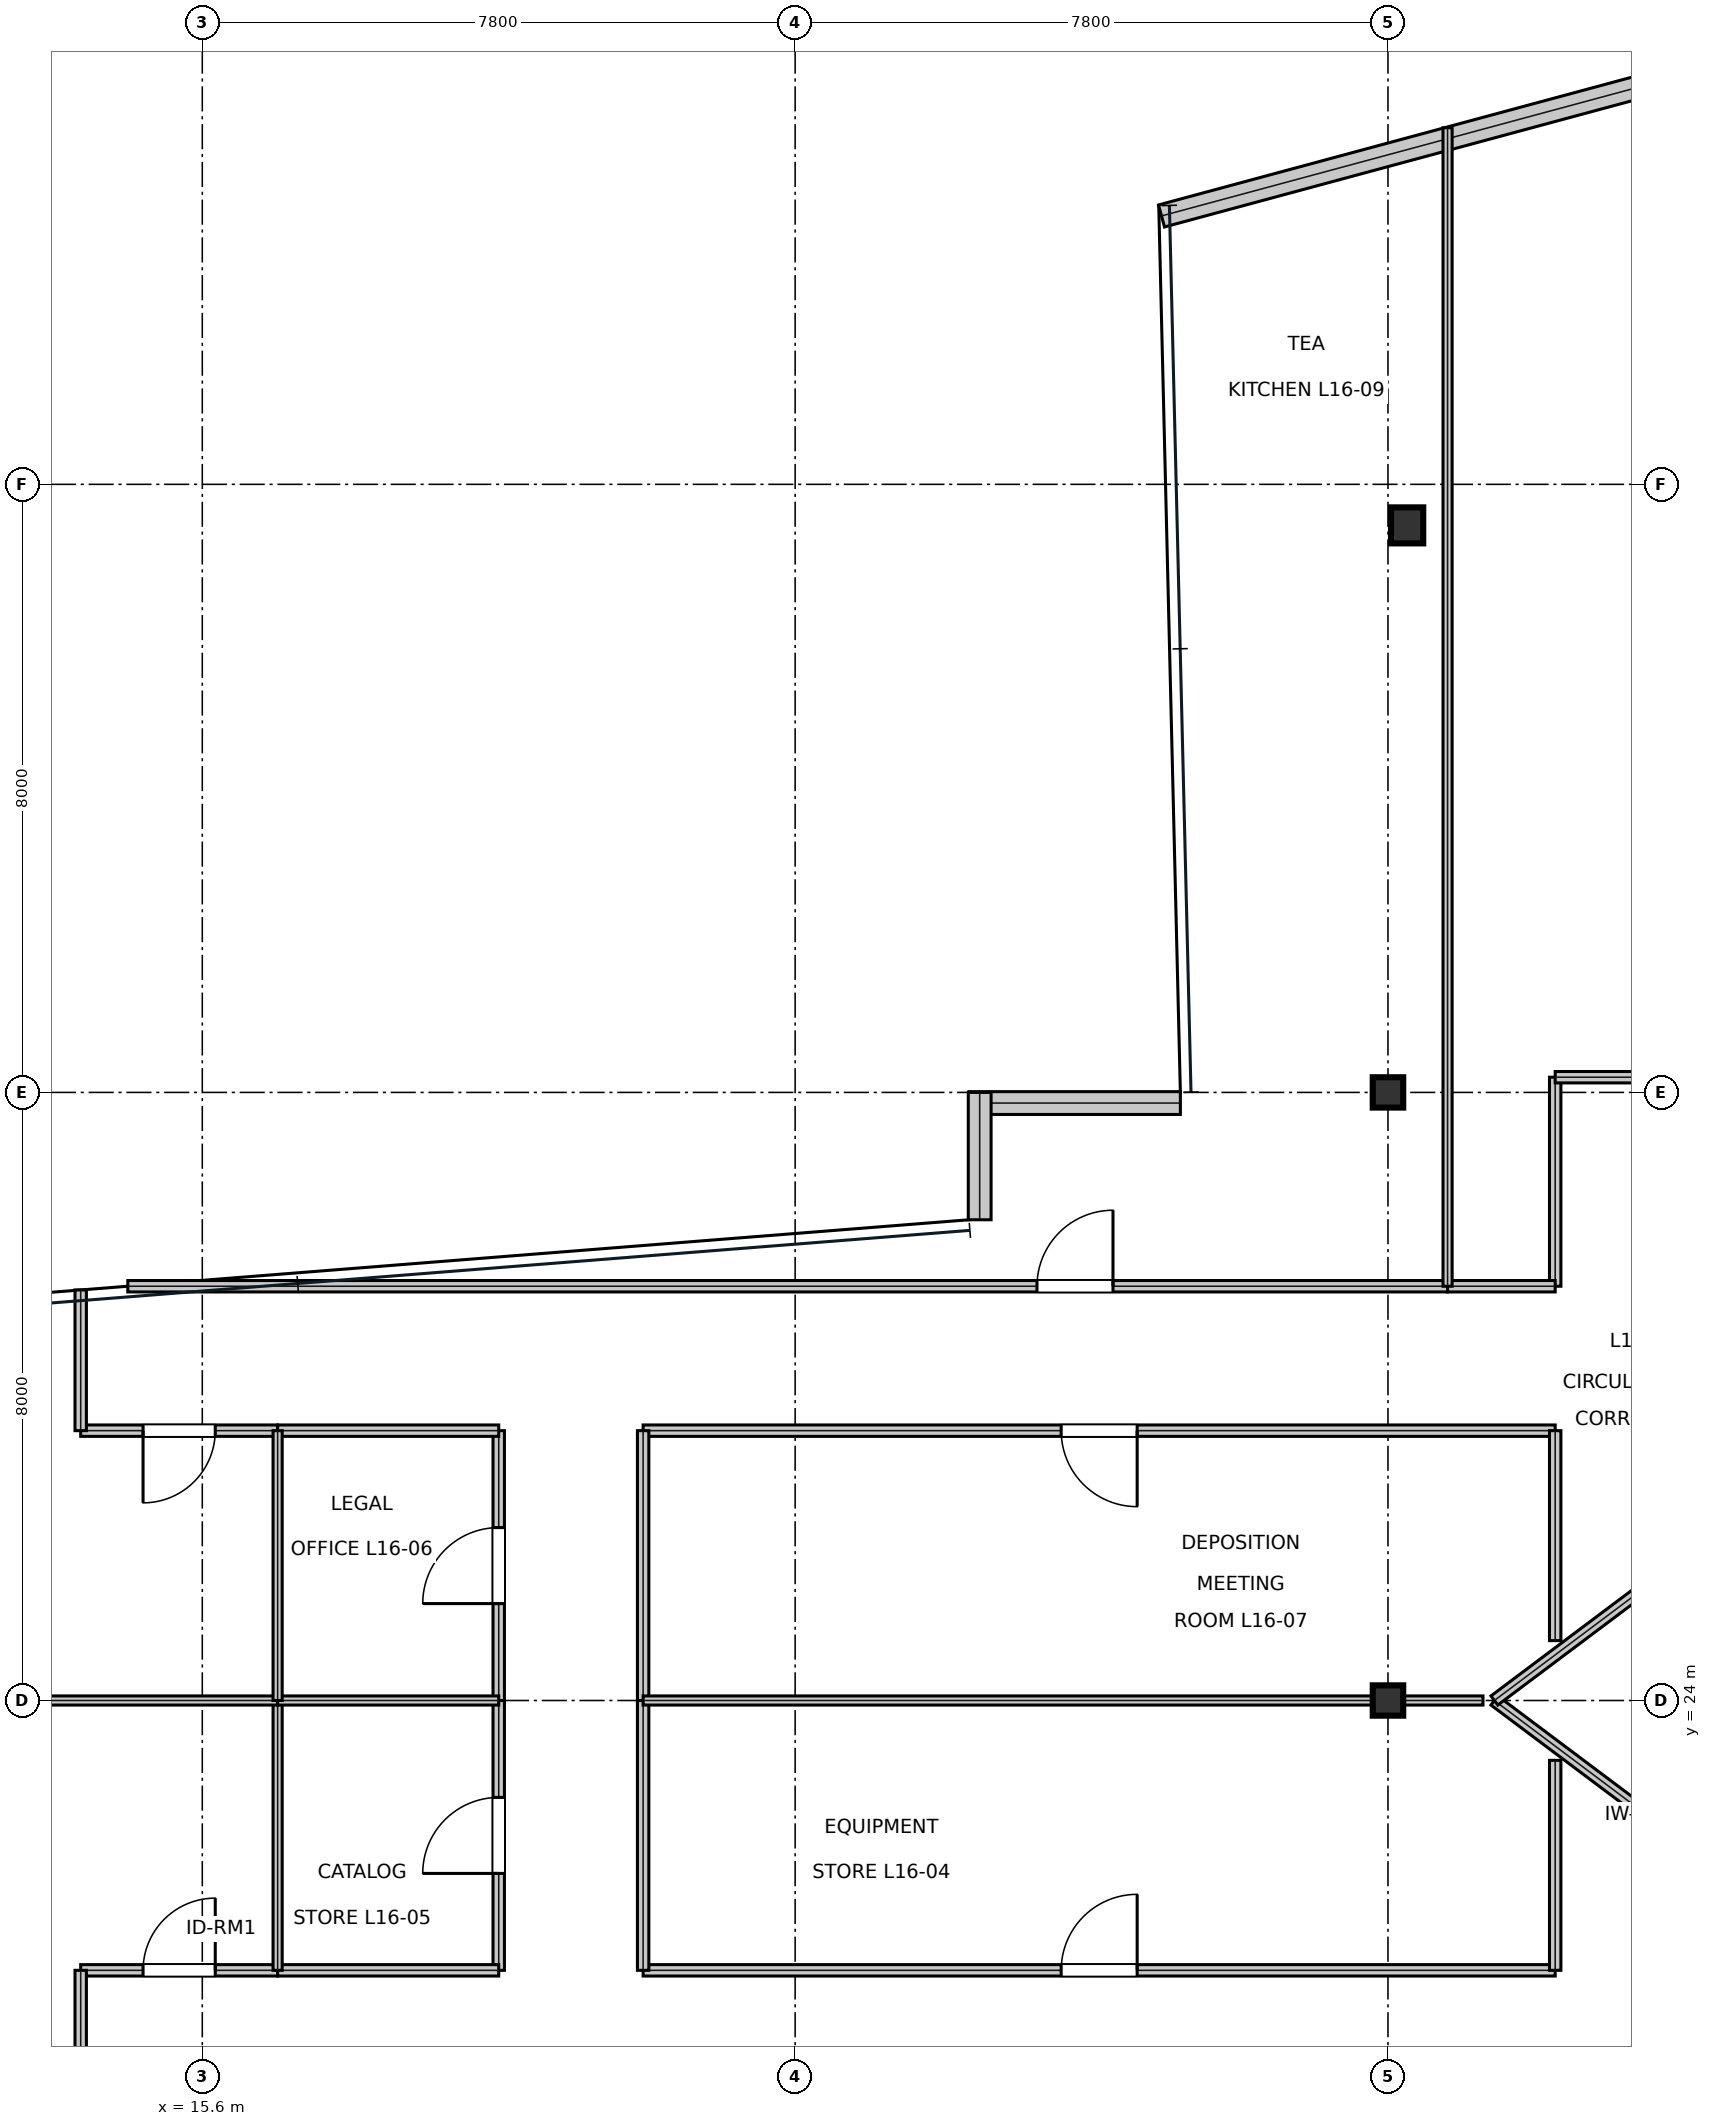
"""IFC4 building model, lengths in metres.
Left out: names, types, materials, properties, quantities, classifications, styles, units other than length and angle.
Written with IfcOpenShell. Run it as: python <this file> out.ifc"""

import sys

from ifc_helpers import new_model, si_unit, direction, frame, frame_2d, origin, origin_2d, place, context, subcontext, project, spatial, rectangle, i_section, extrude, element, fill, save


model = new_model("IFC4")
c1 = context("Model", 3, precision=1e-05, world=origin(), true_north=direction((0.0, 1.0)))
c2 = subcontext(c1, "Body", "Model", "MODEL_VIEW")
j1 = project(units=[si_unit("LENGTHUNIT", "METRE"), si_unit("PLANEANGLEUNIT", "RADIAN")], contexts=[c1])
p1 = place(None, origin())
s1 = spatial("IfcSite", under=j1, at=p1, CompositionType="ELEMENT")
p2 = place(p1, origin())
s2 = spatial("IfcBuilding", under=s1, at=p2, CompositionType="ELEMENT")
p3 = place(p2, frame((0.0, 0.0, 74.25)))
s3 = spatial("IfcBuildingStorey", under=s2, at=p3, CompositionType="ELEMENT", Elevation=74.25)
for number, where, z_axis, x_axis in (
    (1, (31.2, 24.0, 0.0), (0.0, 0.0, 1.0), (1.0, 0.0, 0.0)),
    (2, (31.2, 32.0, 0.0), (0.0, 0.0, 1.0), (1.0, 0.0, 0.0)),
):
    element("IfcColumn", number, at=place(p3, frame(where, z_axis=z_axis, x_axis=x_axis)), inside=s3, PredefinedType="COLUMN", context=c2, shape_type="SweptSolid", body=[
        extrude(i_section(OverallWidth=0.401, OverallDepth=0.399, WebThickness=0.025, FlangeThickness=0.04, at=origin_2d()), origin(), (0.0, 0.0, 1.0), 4.044),
    ])
p4 = place(p3, frame((31.452, 39.46, 0.016), z_axis=(0.0, 0.0, 1.0), x_axis=(1.0, 0.0, 0.0)))
e3 = element("IfcColumn", 3, at=p4, inside=s3, PredefinedType="COLUMN", context=c2, shape_type="SweptSolid", body=[
    extrude(i_section(OverallWidth=0.424, OverallDepth=0.474, WebThickness=0.048, FlangeThickness=0.077, at=origin_2d()), origin(), (0.0, 0.0, 1.0), 4.018),
])
p5 = place(p3, frame((34.962, 45.351, 0.0), z_axis=(0.0, 0.0, 1.0), x_axis=(-0.965438319853, -0.260631637679, 0.0)))
e4 = element("IfcWall", 4, at=p5, inside=s3, PredefinedType="STANDARD", context=c2, shape_type="SweptSolid", body=[
    extrude(rectangle(XDim=6.983, YDim=0.3, at=frame_2d((3.492, 0.0))), origin(), (0.0, 0.0, 1.0), 3.81),
])
p6 = place(p3, frame((28.469, 31.86, 0.0), z_axis=(0.0, 0.0, 1.0), x_axis=(-1.0, 0.0, 0.0)))
e5 = element("IfcWall", 5, at=p6, inside=s3, PredefinedType="STANDARD", context=c2, shape_type="SweptSolid", body=[
    extrude(rectangle(XDim=2.781, YDim=0.3, at=frame_2d((1.39, 0.0))), origin(), (0.0, 0.0, 1.0), 3.81),
])
p7 = place(p3, frame((25.828, 32.0, 0.0), z_axis=(0.0, 0.0, 1.0), x_axis=(0.0, -1.0, 0.0)))
e6 = element("IfcWall", 6, at=p7, inside=s3, PredefinedType="STANDARD", context=c2, shape_type="SweptSolid", body=[
    extrude(rectangle(XDim=1.675, YDim=0.3, at=frame_2d((0.838, 0.0))), origin(), (0.0, 0.0, 1.0), 3.338),
])
p8 = place(p3, frame((14.0, 20.45, 0.0), z_axis=(0.0, 0.0, 1.0), x_axis=(1.0, 0.0, 0.0)))
e7 = element("IfcWall", 7, at=p8, inside=s3, PredefinedType="PARTITIONING", context=c2, shape_type="SweptSolid", body=[
    extrude(rectangle(XDim=2.591, YDim=0.15, at=frame_2d((1.295, 0.0))), origin(), (0.0, 0.0, 1.0), 3.391),
])
p9 = place(p8, frame((0.821, 0.0, 0.0)))
e8 = element("IfcOpeningElement", 8, at=p9, cuts=e7, PredefinedType="OPENING", context=c2, shape_type="SweptSolid", body=[
    extrude(rectangle(XDim=0.95, YDim=2.15, at=frame_2d((0.475, 1.075))), frame((0.0, 0.085, 0.0), z_axis=(0.0, -1.0, 0.0), x_axis=(1.0, 0.0, 0.0)), (0.0, 0.0, 1.0), 0.17),
])
p10 = place(p3, frame((21.4, 20.45, 0.0), z_axis=(0.0, 0.0, 1.0), x_axis=(1.0, 0.0, 0.0)))
e9 = element("IfcWall", 9, at=p10, inside=s3, PredefinedType="PARTITIONING", context=c2, shape_type="SweptSolid", body=[
    extrude(rectangle(XDim=12.0, YDim=0.15, at=frame_2d((6.0, 0.0))), origin(), (0.0, 0.0, 1.0), 3.181),
])
p11 = place(p10, frame((5.5, 0.0, 0.0)))
e10 = element("IfcOpeningElement", 10, at=p11, cuts=e9, PredefinedType="OPENING", context=c2, shape_type="SweptSolid", body=[
    extrude(rectangle(XDim=1.0, YDim=2.15, at=frame_2d((0.5, 1.075))), frame((0.0, 0.085, 0.0), z_axis=(0.0, -1.0, 0.0), x_axis=(1.0, 0.0, 0.0)), (0.0, 0.0, 1.0), 0.17),
])
p12 = place(p3, frame((19.5, 20.45, 0.0), z_axis=(0.0, 0.0, 1.0), x_axis=(0.0, 1.0, 0.0)))
e11 = element("IfcWall", 11, at=p12, inside=s3, PredefinedType="PARTITIONING", context=c2, shape_type="SweptSolid", body=[
    extrude(rectangle(XDim=3.55, YDim=0.15, at=frame_2d((1.775, 0.0))), origin(), (0.0, 0.0, 1.0), 3.181),
])
p13 = place(p12, frame((1.275, 0.0, 0.0)))
e12 = element("IfcOpeningElement", 12, at=p13, cuts=e11, PredefinedType="OPENING", context=c2, shape_type="SweptSolid", body=[
    extrude(rectangle(XDim=1.0, YDim=2.15, at=frame_2d((0.5, 1.075))), frame((0.0, 0.085, 0.0), z_axis=(0.0, -1.0, 0.0), x_axis=(1.0, 0.0, 0.0)), (0.0, 0.0, 1.0), 0.17),
])
p14 = place(p3, frame((19.5, 24.0, 0.0), z_axis=(0.0, 0.0, 1.0), x_axis=(0.0, 1.0, 0.0)))
e13 = element("IfcWall", 13, at=p14, inside=s3, PredefinedType="PARTITIONING", context=c2, shape_type="SweptSolid", body=[
    extrude(rectangle(XDim=3.55, YDim=0.15, at=frame_2d((1.775, 0.0))), origin(), (0.0, 0.0, 1.0), 3.181),
])
p15 = place(p14, frame((1.275, 0.0, 0.0)))
e14 = element("IfcOpeningElement", 14, at=p15, cuts=e13, PredefinedType="OPENING", context=c2, shape_type="SweptSolid", body=[
    extrude(rectangle(XDim=1.0, YDim=2.15, at=frame_2d((0.5, 1.075))), frame((0.0, 0.085, 0.0), z_axis=(0.0, -1.0, 0.0), x_axis=(1.0, 0.0, 0.0)), (0.0, 0.0, 1.0), 0.17),
])
p16 = place(p3, frame((21.4, 27.55, 0.0), z_axis=(0.0, 0.0, 1.0), x_axis=(1.0, 0.0, 0.0)))
e15 = element("IfcWall", 15, at=p16, inside=s3, PredefinedType="PARTITIONING", context=c2, shape_type="SweptSolid", body=[
    extrude(rectangle(XDim=12.0, YDim=0.15, at=frame_2d((6.0, 0.0))), origin(), (0.0, 0.0, 1.0), 3.181),
])
p17 = place(p16, frame((5.5, 0.0, 0.0)))
e16 = element("IfcOpeningElement", 16, at=p17, cuts=e15, PredefinedType="OPENING", context=c2, shape_type="SweptSolid", body=[
    extrude(rectangle(XDim=1.0, YDim=2.15, at=frame_2d((0.5, 1.075))), frame((0.0, 0.085, 0.0), z_axis=(0.0, -1.0, 0.0), x_axis=(1.0, 0.0, 0.0)), (0.0, 0.0, 1.0), 0.17),
])
p18 = place(p3, frame((14.0, 27.55, 0.0), z_axis=(0.0, 0.0, 1.0), x_axis=(1.0, 0.0, 0.0)))
e17 = element("IfcWall", 17, at=p18, inside=s3, PredefinedType="PARTITIONING", context=c2, shape_type="SweptSolid", body=[
    extrude(rectangle(XDim=2.591, YDim=0.15, at=frame_2d((1.295, 0.0))), origin(), (0.0, 0.0, 1.0), 3.81),
])
p19 = place(p18, frame((0.821, 0.0, 0.0)))
e18 = element("IfcOpeningElement", 18, at=p19, cuts=e17, PredefinedType="OPENING", context=c2, shape_type="SweptSolid", body=[
    extrude(rectangle(XDim=0.95, YDim=2.15, at=frame_2d((0.475, 1.075))), frame((0.0, 0.085, 0.0), z_axis=(0.0, -1.0, 0.0), x_axis=(1.0, 0.0, 0.0)), (0.0, 0.0, 1.0), 0.17),
])
p20 = place(p3, frame((14.62, 29.45, 0.0), z_axis=(0.0, 0.0, 1.0), x_axis=(1.0, 0.0, 0.0)))
e19 = element("IfcWall", 19, at=p20, inside=s3, PredefinedType="PARTITIONING", context=c2, shape_type="SweptSolid", body=[
    extrude(rectangle(XDim=17.364, YDim=0.15, at=frame_2d((8.682, 0.0))), origin(), (0.0, 0.0, 1.0), 3.181),
])
p21 = place(p20, frame((11.962, 0.0, 0.0)))
e20 = element("IfcOpeningElement", 20, at=p21, cuts=e19, PredefinedType="OPENING", context=c2, shape_type="SweptSolid", body=[
    extrude(rectangle(XDim=1.0, YDim=2.15, at=frame_2d((0.5, 1.075))), frame((0.0, 0.085, 0.0), z_axis=(0.0, -1.0, 0.0), x_axis=(1.0, 0.0, 0.0)), (0.0, 0.0, 1.0), 0.17),
])
p22 = place(p3, frame((14.0, 18.599, 0.0), z_axis=(0.0, 0.0, 1.0), x_axis=(0.0, 1.0, 0.0)))
e21 = element("IfcWall", 21, at=p22, inside=s3, PredefinedType="PARTITIONING", context=c2, shape_type="SweptSolid", body=[
    extrude(rectangle(XDim=1.851, YDim=0.15, at=frame_2d((0.925, 0.0))), origin(), (0.0, 0.0, 1.0), 3.338),
])
p23 = place(p3, frame((21.4, 20.45, 0.0), z_axis=(0.0, 0.0, 1.0), x_axis=(0.0, 1.0, 0.0)))
e22 = element("IfcWall", 22, at=p23, inside=s3, PredefinedType="PARTITIONING", context=c2, shape_type="SweptSolid", body=[
    extrude(rectangle(XDim=3.55, YDim=0.15, at=frame_2d((1.775, 0.0))), origin(), (0.0, 0.0, 1.0), 3.181),
])
p24 = place(p3, frame((33.4, 20.45, 0.0), z_axis=(0.0, 0.0, 1.0), x_axis=(0.0, 1.0, 0.0)))
e23 = element("IfcWall", 23, at=p24, inside=s3, PredefinedType="PARTITIONING", context=c2, shape_type="SweptSolid", body=[
    extrude(rectangle(XDim=2.762, YDim=0.15, at=frame_2d((1.381, 0.0))), origin(), (0.0, 0.0, 1.0), 3.81),
])
p25 = place(p3, frame((16.591, 20.45, 0.0), z_axis=(0.0, 0.0, 1.0), x_axis=(1.0, 0.0, 0.0)))
e24 = element("IfcWall", 24, at=p25, inside=s3, PredefinedType="PARTITIONING", context=c2, shape_type="SweptSolid", body=[
    extrude(rectangle(XDim=2.909, YDim=0.15, at=frame_2d((1.455, 0.0))), origin(), (0.0, 0.0, 1.0), 3.81),
])
p26 = place(p3, frame((16.591, 27.55, 0.0), z_axis=(0.0, 0.0, 1.0), x_axis=(1.0, 0.0, 0.0)))
e25 = element("IfcWall", 25, at=p26, inside=s3, PredefinedType="PARTITIONING", context=c2, shape_type="SweptSolid", body=[
    extrude(rectangle(XDim=2.909, YDim=0.15, at=frame_2d((1.455, 0.0))), origin(), (0.0, 0.0, 1.0), 3.391),
])
p27 = place(p3, frame((21.4, 24.0, 0.0), z_axis=(0.0, 0.0, 1.0), x_axis=(0.0, 1.0, 0.0)))
e26 = element("IfcWall", 26, at=p27, inside=s3, PredefinedType="PARTITIONING", context=c2, shape_type="SweptSolid", body=[
    extrude(rectangle(XDim=3.55, YDim=0.15, at=frame_2d((1.775, 0.0))), origin(), (0.0, 0.0, 1.0), 3.181),
])
p28 = place(p3, frame((33.4, 24.788, 0.0), z_axis=(0.0, 0.0, 1.0), x_axis=(0.0, 1.0, 0.0)))
e27 = element("IfcWall", 27, at=p28, inside=s3, PredefinedType="PARTITIONING", context=c2, shape_type="SweptSolid", body=[
    extrude(rectangle(XDim=2.762, YDim=0.15, at=frame_2d((1.381, 0.0))), origin(), (0.0, 0.0, 1.0), 3.81),
])
p29 = place(p3, frame((14.0, 27.55, 0.0), z_axis=(0.0, 0.0, 1.0), x_axis=(0.0, 1.0, 0.0)))
e28 = element("IfcWall", 28, at=p29, inside=s3, PredefinedType="PARTITIONING", context=c2, shape_type="SweptSolid", body=[
    extrude(rectangle(XDim=1.851, YDim=0.15, at=frame_2d((0.925, 0.0))), origin(), (0.0, 0.0, 1.0), 3.338),
])
p30 = place(p3, frame((33.4, 29.45, 0.0), z_axis=(0.0, 0.0, 1.0), x_axis=(0.0, 1.0, 0.0)))
e29 = element("IfcWall", 29, at=p30, inside=s3, PredefinedType="PARTITIONING", context=c2, shape_type="SweptSolid", body=[
    extrude(rectangle(XDim=2.75, YDim=0.15, at=frame_2d((1.375, 0.0))), origin(), (0.0, 0.0, 1.0), 3.181),
])
p31 = place(p3, frame((33.4, 32.2, 0.0), z_axis=(0.0, 0.0, 1.0), x_axis=(1.0, 0.0, 0.0)))
e30 = element("IfcWall", 30, at=p31, inside=s3, PredefinedType="PARTITIONING", context=c2, shape_type="SweptSolid", body=[
    extrude(rectangle(XDim=1.9, YDim=0.15, at=frame_2d((0.95, 0.0))), origin(), (0.0, 0.0, 1.0), 3.181),
])
p32 = place(p3, frame((31.984, 29.45, 0.0), z_axis=(0.0, 0.0, 1.0), x_axis=(1.0, 0.0, 0.0)))
e31 = element("IfcWall", 31, at=p32, inside=s3, PredefinedType="PARTITIONING", context=c2, shape_type="SweptSolid", body=[
    extrude(rectangle(XDim=1.416, YDim=0.15, at=frame_2d((0.708, 0.0))), origin(), (0.0, 0.0, 1.0), 3.81),
])
p33 = place(p3, frame((16.591, 20.45, 0.0), z_axis=(0.0, 0.0, 1.0), x_axis=(0.0, 1.0, 0.0)))
e32 = element("IfcWall", 32, at=p33, inside=s3, PredefinedType="PARTITIONING", context=c2, shape_type="SweptSolid", body=[
    extrude(rectangle(XDim=3.55, YDim=0.12, at=frame_2d((1.775, 0.0))), origin(), (0.0, 0.0, 1.0), 3.181),
])
p34 = place(p3, frame((5.816, 24.0, 0.0), z_axis=(0.0, 0.0, 1.0), x_axis=(1.0, 0.0, 0.0)))
e33 = element("IfcWall", 33, at=p34, inside=s3, PredefinedType="PARTITIONING", context=c2, shape_type="SweptSolid", body=[
    extrude(rectangle(XDim=10.775, YDim=0.12, at=frame_2d((5.388, 0.0))), origin(), (0.0, 0.0, 1.0), 3.338),
])
p35 = place(p3, frame((21.4, 24.0, 0.0), z_axis=(0.0, 0.0, 1.0), x_axis=(1.0, 0.0, 0.0)))
e34 = element("IfcWall", 34, at=p35, inside=s3, PredefinedType="PARTITIONING", context=c2, shape_type="SweptSolid", body=[
    extrude(rectangle(XDim=11.05, YDim=0.12, at=frame_2d((5.525, 0.0))), origin(), (0.0, 0.0, 1.0), 3.181),
])
p36 = place(p3, frame((16.591, 24.0, 0.0), z_axis=(0.0, 0.0, 1.0), x_axis=(1.0, 0.0, 0.0)))
e35 = element("IfcWall", 35, at=p36, inside=s3, PredefinedType="PARTITIONING", context=c2, shape_type="SweptSolid", body=[
    extrude(rectangle(XDim=2.909, YDim=0.12, at=frame_2d((1.455, 0.0))), origin(), (0.0, 0.0, 1.0), 3.391),
])
p37 = place(p3, frame((16.591, 24.0, 0.0), z_axis=(0.0, 0.0, 1.0), x_axis=(0.0, 1.0, 0.0)))
e36 = element("IfcWall", 36, at=p37, inside=s3, PredefinedType="PARTITIONING", context=c2, shape_type="SweptSolid", body=[
    extrude(rectangle(XDim=3.55, YDim=0.12, at=frame_2d((1.775, 0.0))), origin(), (0.0, 0.0, 1.0), 3.181),
])
p38 = place(p3, frame((31.984, 29.45, 0.0), z_axis=(0.0, 0.0, 1.0), x_axis=(0.0, 1.0, 0.0)))
e37 = element("IfcWall", 37, at=p38, inside=s3, PredefinedType="PARTITIONING", context=c2, shape_type="SweptSolid", body=[
    extrude(rectangle(XDim=15.242, YDim=0.12, at=frame_2d((7.621, 0.0))), origin(), (0.0, 0.0, 1.0), 3.181),
])
for number, where, z_axis, x_axis in (
    (38, (32.6, 24.0, 0.0), (0.0, 0.0, 1.0), (0.8, -0.6, 0.0)),
    (39, (36.6, 27.0, 0.0), (0.0, 0.0, 1.0), (-0.8, -0.6, 0.0)),
):
    element("IfcWall", number, at=place(p3, frame(where, z_axis=z_axis, x_axis=x_axis)), inside=s3, PredefinedType="MOVABLE", context=c2, shape_type="SweptSolid", body=[
        extrude(rectangle(XDim=5.0, YDim=0.15, at=frame_2d((2.5, 0.0))), origin(), (0.0, 0.0, 1.0), 3.81),
    ])
p39 = place(p9, origin())
e40 = element("IfcDoor", 40, at=p39, inside=s3, OperationType="SINGLE_SWING_RIGHT", PredefinedType="DOOR", context=c2, shape_type="SweptSolid", body=[
    extrude(rectangle(XDim=0.95, YDim=2.15, at=frame_2d((0.475, 1.075))), frame((0.0, 0.025, 0.0), z_axis=(0.0, -1.0, 0.0), x_axis=(1.0, 0.0, 0.0)), (0.0, 0.0, 1.0), 0.05),
])
fill(e8, e40)
p40 = place(p11, origin())
e41 = element("IfcDoor", 41, at=p40, inside=s3, OperationType="SINGLE_SWING_RIGHT", PredefinedType="DOOR", context=c2, shape_type="SweptSolid", body=[
    extrude(rectangle(XDim=1.0, YDim=2.15, at=frame_2d((0.5, 1.075))), frame((0.0, 0.025, 0.0), z_axis=(0.0, -1.0, 0.0), x_axis=(1.0, 0.0, 0.0)), (0.0, 0.0, 1.0), 0.05),
])
fill(e10, e41)
p41 = place(p13, origin())
e42 = element("IfcDoor", 42, at=p41, inside=s3, OperationType="SINGLE_SWING_LEFT", PredefinedType="DOOR", context=c2, shape_type="SweptSolid", body=[
    extrude(rectangle(XDim=1.0, YDim=2.15, at=frame_2d((0.5, 1.075))), frame((0.0, 0.025, 0.0), z_axis=(0.0, -1.0, 0.0), x_axis=(1.0, 0.0, 0.0)), (0.0, 0.0, 1.0), 0.05),
])
fill(e12, e42)
p42 = place(p15, origin())
e43 = element("IfcDoor", 43, at=p42, inside=s3, OperationType="SINGLE_SWING_LEFT", PredefinedType="DOOR", context=c2, shape_type="SweptSolid", body=[
    extrude(rectangle(XDim=1.0, YDim=2.15, at=frame_2d((0.5, 1.075))), frame((0.0, 0.025, 0.0), z_axis=(0.0, -1.0, 0.0), x_axis=(1.0, 0.0, 0.0)), (0.0, 0.0, 1.0), 0.05),
])
fill(e14, e43)
p43 = place(p17, frame((1.0, 0.0, 0.0), z_axis=(0.0, 0.0, 1.0), x_axis=(-1.0, 0.0, 0.0)))
e44 = element("IfcDoor", 44, at=p43, inside=s3, OperationType="SINGLE_SWING_LEFT", PredefinedType="DOOR", context=c2, shape_type="SweptSolid", body=[
    extrude(rectangle(XDim=1.0, YDim=2.15, at=frame_2d((0.5, 1.075))), frame((0.0, 0.025, 0.0), z_axis=(0.0, -1.0, 0.0), x_axis=(1.0, 0.0, 0.0)), (0.0, 0.0, 1.0), 0.05),
])
fill(e16, e44)
p44 = place(p19, frame((0.95, 0.0, 0.0), z_axis=(0.0, 0.0, 1.0), x_axis=(-1.0, 0.0, 0.0)))
e45 = element("IfcDoor", 45, at=p44, inside=s3, OperationType="SINGLE_SWING_RIGHT", PredefinedType="DOOR", context=c2, shape_type="SweptSolid", body=[
    extrude(rectangle(XDim=0.95, YDim=2.15, at=frame_2d((0.475, 1.075))), frame((0.0, 0.025, 0.0), z_axis=(0.0, -1.0, 0.0), x_axis=(1.0, 0.0, 0.0)), (0.0, 0.0, 1.0), 0.05),
])
fill(e18, e45)
p45 = place(p21, origin())
e46 = element("IfcDoor", 46, at=p45, inside=s3, OperationType="SINGLE_SWING_RIGHT", PredefinedType="DOOR", context=c2, shape_type="SweptSolid", body=[
    extrude(rectangle(XDim=1.0, YDim=2.15, at=frame_2d((0.5, 1.075))), frame((0.0, 0.025, 0.0), z_axis=(0.0, -1.0, 0.0), x_axis=(1.0, 0.0, 0.0)), (0.0, 0.0, 1.0), 0.05),
])
fill(e20, e46)
save(model, sys.argv[1])
